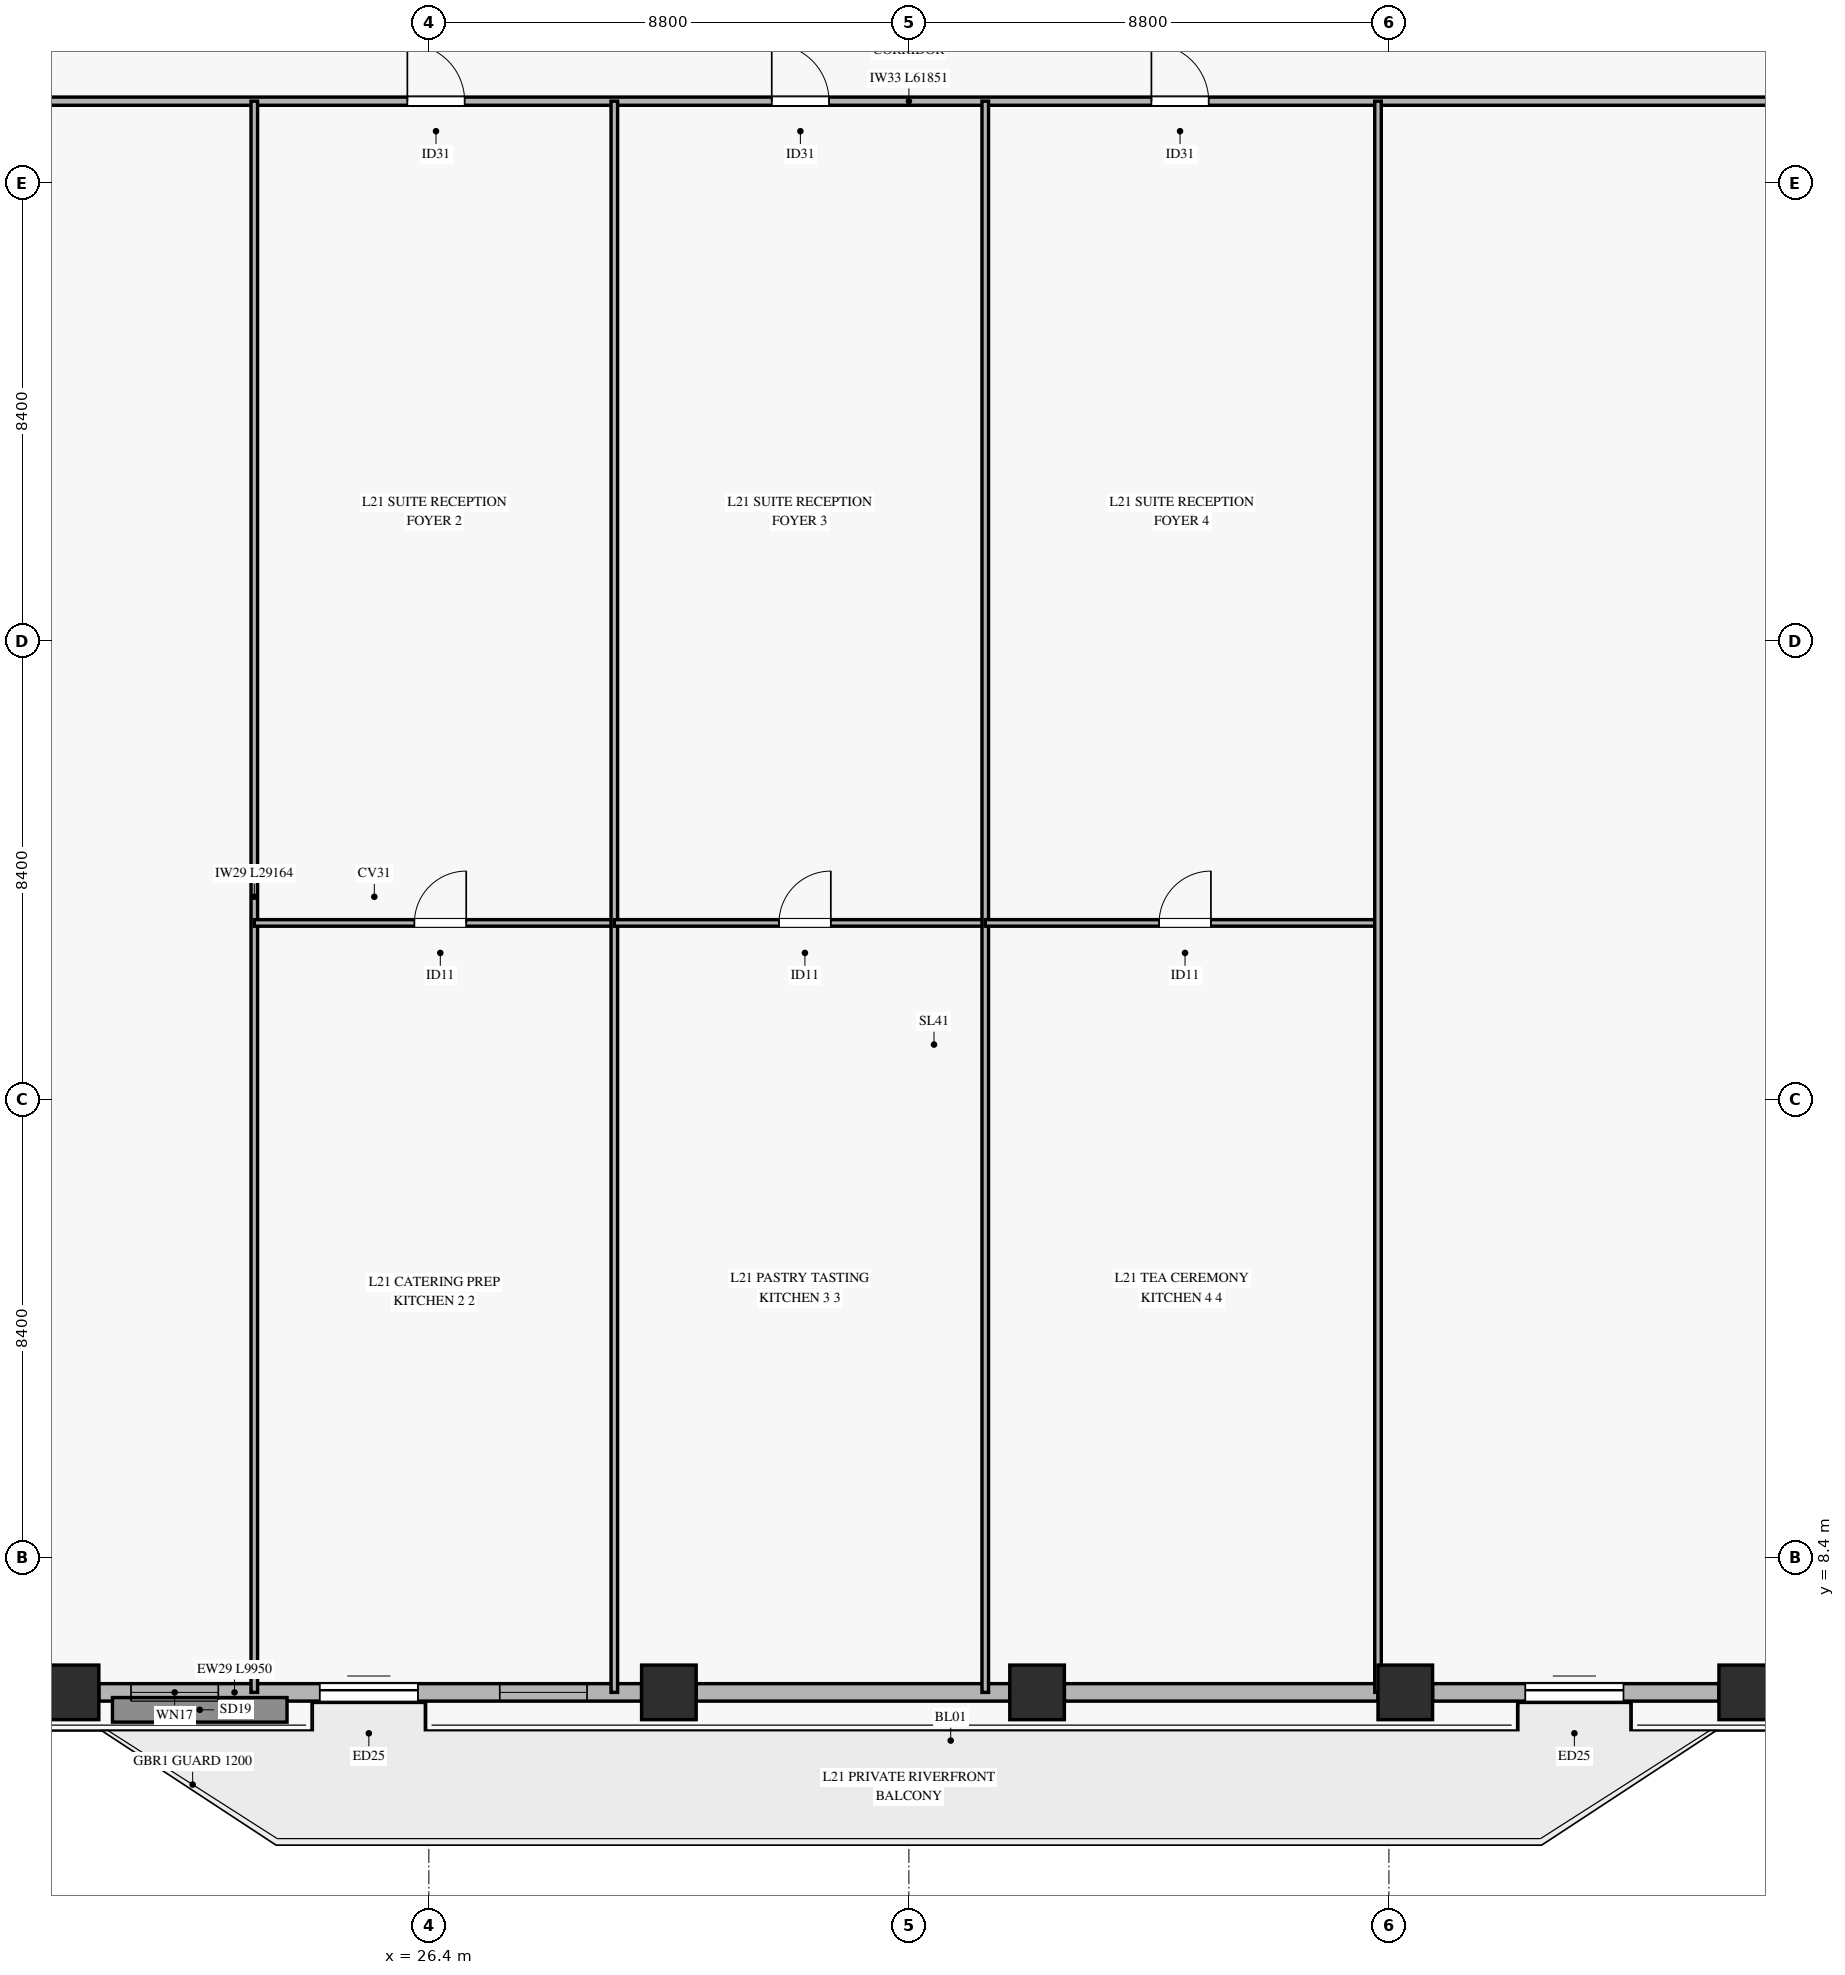
"""IFC4 building model, lengths in metres.
Left out: names, types, materials, properties, quantities, classifications, styles, units other than length and angle.
Written with IfcOpenShell. Run it as: python <this file> out.ifc"""

import sys

from ifc_helpers import new_model, si_unit, direction, frame, frame_2d, origin, origin_2d, place, context, subcontext, project, spatial, rectangle, hollow_rectangle, extrude, source, transform, mapped, element, fill, save


model = new_model("IFC4")
c1 = context("Model", 3, precision=1e-05, world=origin(), true_north=direction((0.0, 1.0)))
c2 = subcontext(c1, "Body", "Model", "MODEL_VIEW")
j1 = project(units=[si_unit("LENGTHUNIT", "METRE"), si_unit("PLANEANGLEUNIT", "RADIAN")], contexts=[c1])
p1 = place(None, origin())
s1 = spatial("IfcSite", under=j1, at=p1, CompositionType="ELEMENT")
p2 = place(p1, origin())
s2 = spatial("IfcBuilding", under=s1, at=p2, CompositionType="ELEMENT")
p3 = place(p2, frame((0.0, 0.0, 87.4)))
s3 = spatial("IfcBuildingStorey", under=s2, at=p3, CompositionType="ELEMENT", Elevation=87.4)
m1 = source(origin(), c2, "Body", "SweptSolid", [
    extrude(hollow_rectangle(XDim=1.0, YDim=1.0, WallThickness=0.045, at=origin_2d()), origin(), (0.0, 0.0, 1.0), 3.68),
])
for number, where, z_axis, x_axis in (
    (1, (19.85, 5.936, 0.0), (0.0, 0.0, 1.0), (1.0, 0.0, 0.0)),
    (2, (30.8, 5.936, 0.0), (0.0, 0.0, 1.0), (1.0, 0.0, 0.0)),
    (3, (37.55, 5.936, 0.0), (0.0, 0.0, 1.0), (1.0, 0.0, 0.0)),
    (4, (44.3, 5.936, 0.0), (0.0, 0.0, 1.0), (1.0, 0.0, 0.0)),
    (5, (50.55, 5.936, 0.0), (0.0, 0.0, 1.0), (1.0, 0.0, 0.0)),
):
    element("IfcColumn", number, at=place(p3, frame(where, z_axis=z_axis, x_axis=x_axis)), inside=s3, PredefinedType="COLUMN", context=c2, shape_type="MappedRepresentation", body=[
        mapped(m1, transform((0.0, 0.0, 0.0), x_axis=(1.0, 0.0, 0.0), y_axis=(0.0, 1.0, 0.0), z_axis=(0.0, 0.0, 1.0), scale=1.0)),
    ])
p4 = place(p3, frame((20.35, 5.936, 0.0), z_axis=(0.0, 0.0, 1.0), x_axis=(1.0, 0.0, 0.0)))
e6 = element("IfcWall", 6, at=p4, inside=s3, PredefinedType="SOLIDWALL", context=c2, shape_type="SweptSolid", body=[
    extrude(rectangle(XDim=9.95, YDim=0.32, at=frame_2d((4.975, 0.0))), origin(), (0.0, 0.0, 1.0), 3.16),
])
p5 = place(p4, frame((4.05, 0.0, 0.0)))
e7 = element("IfcOpeningElement", 7, at=p5, cuts=e6, PredefinedType="OPENING", context=c2, shape_type="SweptSolid", body=[
    extrude(rectangle(XDim=1.8, YDim=2.25, at=frame_2d((0.9, 1.125))), frame((0.0, 0.17, 0.0), z_axis=(0.0, -1.0, 0.0), x_axis=(1.0, 0.0, 0.0)), (0.0, 0.0, 1.0), 0.34),
])
p6 = place(p4, frame((0.59, 0.0, 0.45)))
e8 = element("IfcOpeningElement", 8, at=p6, cuts=e6, PredefinedType="OPENING", context=c2, shape_type="SweptSolid", body=[
    extrude(rectangle(XDim=1.6, YDim=2.0, at=frame_2d((0.8, 1.0))), frame((0.0, 0.17, 0.0), z_axis=(0.0, -1.0, 0.0), x_axis=(1.0, 0.0, 0.0)), (0.0, 0.0, 1.0), 0.34),
])
p7 = place(p4, frame((7.35, 0.0, 0.45)))
e9 = element("IfcOpeningElement", 9, at=p7, cuts=e6, PredefinedType="OPENING", context=c2, shape_type="SweptSolid", body=[
    extrude(rectangle(XDim=1.6, YDim=2.0, at=frame_2d((0.8, 1.0))), frame((0.0, 0.17, 0.0), z_axis=(0.0, -1.0, 0.0), x_axis=(1.0, 0.0, 0.0)), (0.0, 0.0, 1.0), 0.34),
])
for number, where, z_axis, x_axis in (
    (10, (31.3, 5.936, 0.0), (0.0, 0.0, 1.0), (1.0, 0.0, 0.0)),
    (11, (38.05, 5.936, 0.0), (0.0, 0.0, 1.0), (1.0, 0.0, 0.0)),
):
    element("IfcWall", number, at=place(p3, frame(where, z_axis=z_axis, x_axis=x_axis)), inside=s3, PredefinedType="SOLIDWALL", context=c2, shape_type="SweptSolid", body=[
        extrude(rectangle(XDim=5.75, YDim=0.32, at=frame_2d((2.875, 0.0))), origin(), (0.0, 0.0, 1.0), 3.16),
    ])
p8 = place(p3, frame((44.8, 5.936, 0.0), z_axis=(0.0, 0.0, 1.0), x_axis=(1.0, 0.0, 0.0)))
e12 = element("IfcWall", 12, at=p8, inside=s3, PredefinedType="SOLIDWALL", context=c2, shape_type="SweptSolid", body=[
    extrude(rectangle(XDim=5.25, YDim=0.32, at=frame_2d((2.625, 0.0))), origin(), (0.0, 0.0, 1.0), 3.16),
])
p9 = place(p8, frame((1.7, 0.0, 0.0)))
e13 = element("IfcOpeningElement", 13, at=p9, cuts=e12, PredefinedType="OPENING", context=c2, shape_type="SweptSolid", body=[
    extrude(rectangle(XDim=1.8, YDim=2.25, at=frame_2d((0.9, 1.125))), frame((0.0, 0.17, 0.0), z_axis=(0.0, -1.0, 0.0), x_axis=(1.0, 0.0, 0.0)), (0.0, 0.0, 1.0), 0.34),
])
p10 = place(p3, frame((4.275, 35.1, 0.0), z_axis=(0.0, 0.0, 1.0), x_axis=(1.0, 0.0, 0.0)))
e14 = element("IfcWall", 14, at=p10, inside=s3, PredefinedType="PARTITIONING", context=c2, shape_type="SweptSolid", body=[
    extrude(rectangle(XDim=61.851, YDim=0.15, at=frame_2d((30.926, 0.0))), origin(), (0.0, 0.0, 1.0), 2.765),
])
p11 = place(p10, frame((8.227, 0.0, 0.0)))
e15 = element("IfcOpeningElement", 15, at=p11, cuts=e14, PredefinedType="OPENING", context=c2, shape_type="SweptSolid", body=[
    extrude(rectangle(XDim=1.05, YDim=2.15, at=frame_2d((0.525, 1.075))), frame((0.0, 0.085, 0.0), z_axis=(0.0, -1.0, 0.0), x_axis=(1.0, 0.0, 0.0)), (0.0, 0.0, 1.0), 0.17),
])
p12 = place(p10, frame((21.731, 0.0, 0.0)))
e16 = element("IfcOpeningElement", 16, at=p12, cuts=e14, PredefinedType="OPENING", context=c2, shape_type="SweptSolid", body=[
    extrude(rectangle(XDim=1.05, YDim=2.15, at=frame_2d((0.525, 1.075))), frame((0.0, 0.085, 0.0), z_axis=(0.0, -1.0, 0.0), x_axis=(1.0, 0.0, 0.0)), (0.0, 0.0, 1.0), 0.17),
])
p13 = place(p10, frame((28.411, 0.0, 0.0)))
e17 = element("IfcOpeningElement", 17, at=p13, cuts=e14, PredefinedType="OPENING", context=c2, shape_type="SweptSolid", body=[
    extrude(rectangle(XDim=1.05, YDim=2.15, at=frame_2d((0.525, 1.075))), frame((0.0, 0.085, 0.0), z_axis=(0.0, -1.0, 0.0), x_axis=(1.0, 0.0, 0.0)), (0.0, 0.0, 1.0), 0.17),
])
p14 = place(p10, frame((35.371, 0.0, 0.0)))
e18 = element("IfcOpeningElement", 18, at=p14, cuts=e14, PredefinedType="OPENING", context=c2, shape_type="SweptSolid", body=[
    extrude(rectangle(XDim=1.05, YDim=2.15, at=frame_2d((0.525, 1.075))), frame((0.0, 0.085, 0.0), z_axis=(0.0, -1.0, 0.0), x_axis=(1.0, 0.0, 0.0)), (0.0, 0.0, 1.0), 0.17),
])
p15 = place(p10, frame((48.981, 0.0, 0.0)))
e19 = element("IfcOpeningElement", 19, at=p15, cuts=e14, PredefinedType="OPENING", context=c2, shape_type="SweptSolid", body=[
    extrude(rectangle(XDim=1.05, YDim=2.15, at=frame_2d((0.525, 1.075))), frame((0.0, 0.085, 0.0), z_axis=(0.0, -1.0, 0.0), x_axis=(1.0, 0.0, 0.0)), (0.0, 0.0, 1.0), 0.17),
])
p16 = place(p3, frame((23.2, 5.936, 0.0), z_axis=(0.0, 0.0, 1.0), x_axis=(0.0, 1.0, 0.0)))
e20 = element("IfcWall", 20, at=p16, inside=s3, PredefinedType="PARTITIONING", context=c2, shape_type="SweptSolid", body=[
    extrude(rectangle(XDim=29.164, YDim=0.12, at=frame_2d((14.582, 0.0))), origin(), (0.0, 0.0, 1.0), 3.165),
])
p17 = place(p3, frame((23.2, 20.039, 0.0), z_axis=(0.0, 0.0, 1.0), x_axis=(1.0, 0.0, 0.0)))
e21 = element("IfcWall", 21, at=p17, inside=s3, PredefinedType="PARTITIONING", context=c2, shape_type="SweptSolid", body=[
    extrude(rectangle(XDim=6.6, YDim=0.12, at=frame_2d((3.3, 0.0))), origin(), (0.0, 0.0, 1.0), 3.68),
])
p18 = place(p17, frame((2.935, 0.0, 0.0)))
e22 = element("IfcOpeningElement", 22, at=p18, cuts=e21, PredefinedType="OPENING", context=c2, shape_type="SweptSolid", body=[
    extrude(rectangle(XDim=0.95, YDim=2.1, at=frame_2d((0.475, 1.05))), frame((0.0, 0.07, 0.0), z_axis=(0.0, -1.0, 0.0), x_axis=(1.0, 0.0, 0.0)), (0.0, 0.0, 1.0), 0.14),
])
p19 = place(p3, frame((29.8, 5.936, 0.0), z_axis=(0.0, 0.0, 1.0), x_axis=(0.0, 1.0, 0.0)))
e23 = element("IfcWall", 23, at=p19, inside=s3, PredefinedType="PARTITIONING", context=c2, shape_type="SweptSolid", body=[
    extrude(rectangle(XDim=29.164, YDim=0.12, at=frame_2d((14.582, 0.0))), origin(), (0.0, 0.0, 1.0), 3.165),
])
p20 = place(p3, frame((29.8, 20.039, 0.0), z_axis=(0.0, 0.0, 1.0), x_axis=(1.0, 0.0, 0.0)))
e24 = element("IfcWall", 24, at=p20, inside=s3, PredefinedType="PARTITIONING", context=c2, shape_type="SweptSolid", body=[
    extrude(rectangle(XDim=6.8, YDim=0.12, at=frame_2d((3.4, 0.0))), origin(), (0.0, 0.0, 1.0), 2.765),
])
p21 = place(p20, frame((3.019, 0.0, 0.0)))
e25 = element("IfcOpeningElement", 25, at=p21, cuts=e24, PredefinedType="OPENING", context=c2, shape_type="SweptSolid", body=[
    extrude(rectangle(XDim=0.95, YDim=2.1, at=frame_2d((0.475, 1.05))), frame((0.0, 0.07, 0.0), z_axis=(0.0, -1.0, 0.0), x_axis=(1.0, 0.0, 0.0)), (0.0, 0.0, 1.0), 0.14),
])
p22 = place(p3, frame((36.6, 5.936, 0.0), z_axis=(0.0, 0.0, 1.0), x_axis=(0.0, 1.0, 0.0)))
e26 = element("IfcWall", 26, at=p22, inside=s3, PredefinedType="PARTITIONING", context=c2, shape_type="SweptSolid", body=[
    extrude(rectangle(XDim=29.164, YDim=0.12, at=frame_2d((14.582, 0.0))), origin(), (0.0, 0.0, 1.0), 3.165),
])
p23 = place(p3, frame((36.6, 20.039, 0.0), z_axis=(0.0, 0.0, 1.0), x_axis=(1.0, 0.0, 0.0)))
e27 = element("IfcWall", 27, at=p23, inside=s3, PredefinedType="PARTITIONING", context=c2, shape_type="SweptSolid", body=[
    extrude(rectangle(XDim=7.2, YDim=0.12, at=frame_2d((3.6, 0.0))), origin(), (0.0, 0.0, 1.0), 2.765),
])
p24 = place(p23, frame((3.187, 0.0, 0.0)))
e28 = element("IfcOpeningElement", 28, at=p24, cuts=e27, PredefinedType="OPENING", context=c2, shape_type="SweptSolid", body=[
    extrude(rectangle(XDim=0.95, YDim=2.1, at=frame_2d((0.475, 1.05))), frame((0.0, 0.07, 0.0), z_axis=(0.0, -1.0, 0.0), x_axis=(1.0, 0.0, 0.0)), (0.0, 0.0, 1.0), 0.14),
])
p25 = place(p3, frame((43.8, 5.936, 0.0), z_axis=(0.0, 0.0, 1.0), x_axis=(0.0, 1.0, 0.0)))
e29 = element("IfcWall", 29, at=p25, inside=s3, PredefinedType="PARTITIONING", context=c2, shape_type="SweptSolid", body=[
    extrude(rectangle(XDim=29.164, YDim=0.12, at=frame_2d((14.582, 0.0))), origin(), (0.0, 0.0, 1.0), 3.215),
])
m2 = source(origin(), c2, "Body", "SweptSolid", [
    extrude(rectangle(XDim=1.8, YDim=2.25, at=frame_2d((0.9, 1.125))), frame((0.0, 0.025, 0.0), z_axis=(0.0, -1.0, 0.0), x_axis=(1.0, 0.0, 0.0)), (0.0, 0.0, 1.0), 0.05),
])
p26 = place(p5, origin())
e30 = element("IfcDoor", 30, at=p26, inside=s3, OperationType="SLIDING_TO_LEFT", PredefinedType="DOOR", context=c2, shape_type="MappedRepresentation", body=[
    mapped(m2, transform((0.0, 0.0, 0.0), x_axis=(1.0, 0.0, 0.0), y_axis=(0.0, 1.0, 0.0), z_axis=(0.0, 0.0, 1.0), scale=1.0)),
])
fill(e7, e30)
m3 = source(origin(), c2, "Body", "SweptSolid", [
    extrude(rectangle(XDim=1.6, YDim=2.0, at=frame_2d((0.8, 1.0))), frame((0.0, 0.03, 0.0), z_axis=(0.0, -1.0, 0.0), x_axis=(1.0, 0.0, 0.0)), (0.0, 0.0, 1.0), 0.06),
])
p27 = place(p6, origin())
e31 = element("IfcWindow", 31, at=p27, inside=s3, PartitioningType="SINGLE_PANEL", PredefinedType="WINDOW", context=c2, shape_type="MappedRepresentation", body=[
    mapped(m3, transform((0.0, 0.0, 0.0), x_axis=(1.0, 0.0, 0.0), y_axis=(0.0, 1.0, 0.0), z_axis=(0.0, 0.0, 1.0), scale=1.0)),
])
fill(e8, e31)
p28 = place(p7, origin())
e32 = element("IfcWindow", 32, at=p28, inside=s3, PartitioningType="SINGLE_PANEL", PredefinedType="WINDOW", context=c2, shape_type="MappedRepresentation", body=[
    mapped(m3, transform((0.0, 0.0, 0.0), x_axis=(1.0, 0.0, 0.0), y_axis=(0.0, 1.0, 0.0), z_axis=(0.0, 0.0, 1.0), scale=1.0)),
])
fill(e9, e32)
p29 = place(p9, origin())
e33 = element("IfcDoor", 33, at=p29, inside=s3, OperationType="SLIDING_TO_LEFT", PredefinedType="DOOR", context=c2, shape_type="MappedRepresentation", body=[
    mapped(m2, transform((0.0, 0.0, 0.0), x_axis=(1.0, 0.0, 0.0), y_axis=(0.0, 1.0, 0.0), z_axis=(0.0, 0.0, 1.0), scale=1.0)),
])
fill(e13, e33)
m4 = source(origin(), c2, "Body", "SweptSolid", [
    extrude(rectangle(XDim=1.05, YDim=2.15, at=frame_2d((0.525, 1.075))), frame((0.0, 0.025, 0.0), z_axis=(0.0, -1.0, 0.0), x_axis=(1.0, 0.0, 0.0)), (0.0, 0.0, 1.0), 0.05),
])
p30 = place(p12, origin())
e34 = element("IfcDoor", 34, at=p30, inside=s3, OperationType="SINGLE_SWING_LEFT", PredefinedType="DOOR", context=c2, shape_type="MappedRepresentation", body=[
    mapped(m4, transform((0.0, 0.0, 0.0), x_axis=(1.0, 0.0, 0.0), y_axis=(0.0, 1.0, 0.0), z_axis=(0.0, 0.0, 1.0), scale=1.0)),
])
fill(e16, e34)
m5 = source(origin(), c2, "Body", "SweptSolid", [
    extrude(rectangle(XDim=0.95, YDim=2.1, at=frame_2d((0.475, 1.05))), frame((0.0, 0.025, 0.0), z_axis=(0.0, -1.0, 0.0), x_axis=(1.0, 0.0, 0.0)), (0.0, 0.0, 1.0), 0.05),
])
p31 = place(p18, origin())
e35 = element("IfcDoor", 35, at=p31, inside=s3, OperationType="SINGLE_SWING_RIGHT", PredefinedType="DOOR", context=c2, shape_type="MappedRepresentation", body=[
    mapped(m5, transform((0.0, 0.0, 0.0), x_axis=(1.0, 0.0, 0.0), y_axis=(0.0, 1.0, 0.0), z_axis=(0.0, 0.0, 1.0), scale=1.0)),
])
fill(e22, e35)
p32 = place(p13, origin())
e36 = element("IfcDoor", 36, at=p32, inside=s3, OperationType="SINGLE_SWING_LEFT", PredefinedType="DOOR", context=c2, shape_type="MappedRepresentation", body=[
    mapped(m4, transform((0.0, 0.0, 0.0), x_axis=(1.0, 0.0, 0.0), y_axis=(0.0, 1.0, 0.0), z_axis=(0.0, 0.0, 1.0), scale=1.0)),
])
fill(e17, e36)
p33 = place(p21, origin())
e37 = element("IfcDoor", 37, at=p33, inside=s3, OperationType="SINGLE_SWING_RIGHT", PredefinedType="DOOR", context=c2, shape_type="MappedRepresentation", body=[
    mapped(m5, transform((0.0, 0.0, 0.0), x_axis=(1.0, 0.0, 0.0), y_axis=(0.0, 1.0, 0.0), z_axis=(0.0, 0.0, 1.0), scale=1.0)),
])
fill(e25, e37)
p34 = place(p14, origin())
e38 = element("IfcDoor", 38, at=p34, inside=s3, OperationType="SINGLE_SWING_LEFT", PredefinedType="DOOR", context=c2, shape_type="MappedRepresentation", body=[
    mapped(m4, transform((0.0, 0.0, 0.0), x_axis=(1.0, 0.0, 0.0), y_axis=(0.0, 1.0, 0.0), z_axis=(0.0, 0.0, 1.0), scale=1.0)),
])
fill(e18, e38)
p35 = place(p24, origin())
e39 = element("IfcDoor", 39, at=p35, inside=s3, OperationType="SINGLE_SWING_RIGHT", PredefinedType="DOOR", context=c2, shape_type="MappedRepresentation", body=[
    mapped(m5, transform((0.0, 0.0, 0.0), x_axis=(1.0, 0.0, 0.0), y_axis=(0.0, 1.0, 0.0), z_axis=(0.0, 0.0, 1.0), scale=1.0)),
])
fill(e28, e39)
save(model, sys.argv[1])
